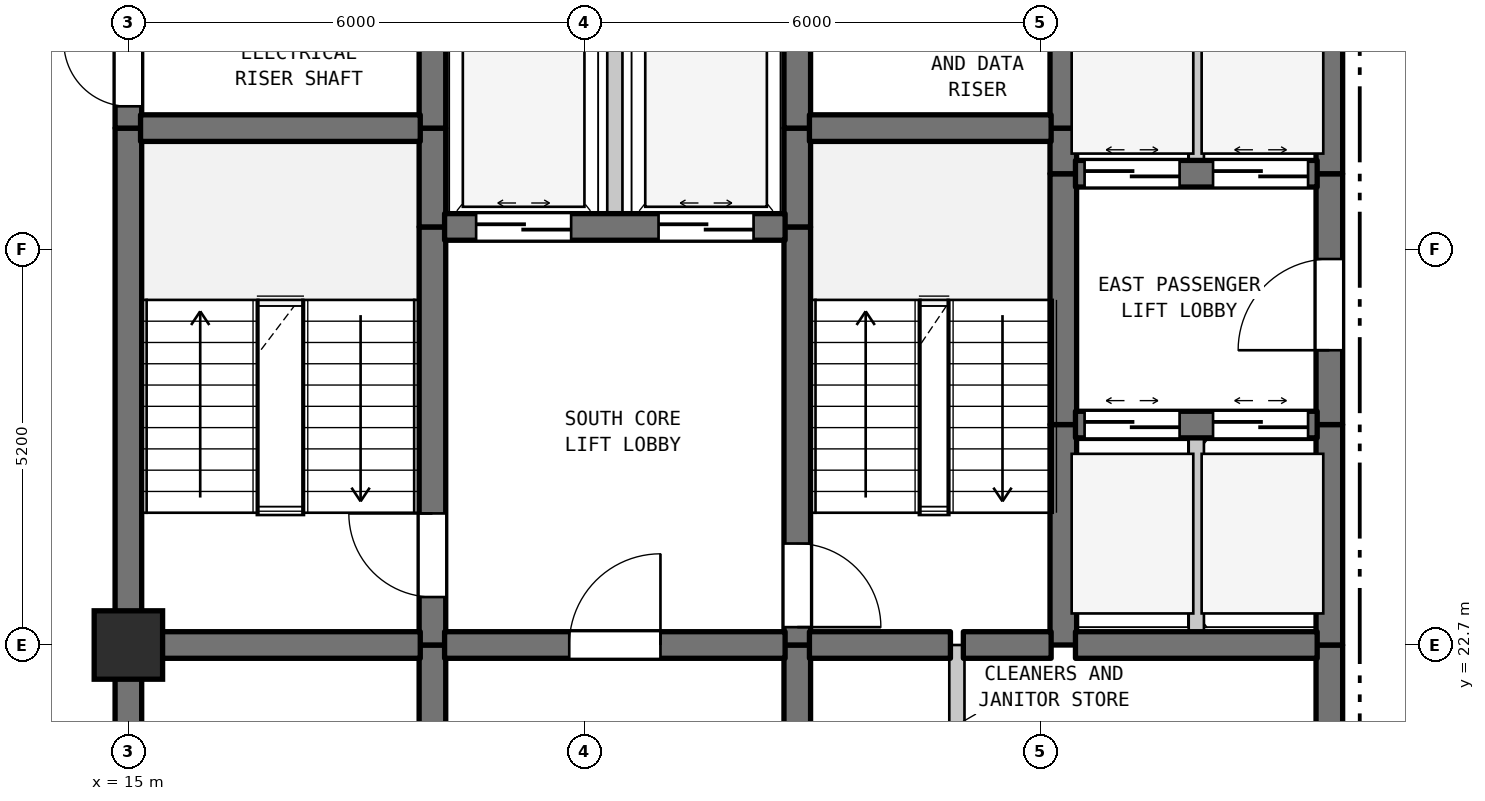
"""IFC4 building model, lengths in metres.
Left out: names, types, materials, properties, quantities, classifications, styles, units other than length and angle.
Written with IfcOpenShell. Run it as: python <this file> out.ifc"""

import sys

from ifc_helpers import new_model, si_unit, direction, frame, frame_2d, origin, origin_2d, place, context, subcontext, project, spatial, rectangle, extrude, element, fill, save


model = new_model("IFC4")
c1 = context("Model", 3, precision=1e-05, world=origin(), true_north=direction((0.0, 1.0)))
c2 = subcontext(c1, "Body", "Model", "MODEL_VIEW")
j1 = project(units=[si_unit("LENGTHUNIT", "METRE"), si_unit("PLANEANGLEUNIT", "RADIAN")], contexts=[c1])
p1 = place(None, origin())
s1 = spatial("IfcSite", under=j1, at=p1, CompositionType="ELEMENT")
p2 = place(p1, origin())
s2 = spatial("IfcBuilding", under=s1, at=p2, CompositionType="ELEMENT")
p3 = place(p2, frame((0.0, 0.0, 129.8)))
s3 = spatial("IfcBuildingStorey", under=s2, at=p3, CompositionType="ELEMENT", Elevation=129.8)
p4 = place(p3, frame((15.0, 22.7, 0.0), z_axis=(0.0, 0.0, 1.0), x_axis=(1.0, 0.0, 0.0)))
e1 = element("IfcColumn", 1, at=p4, inside=s3, PredefinedType="COLUMN", context=c2, shape_type="SweptSolid", body=[
    extrude(rectangle(XDim=0.9, YDim=0.9, at=origin_2d()), origin(), (0.0, 0.0, 1.0), 3.7),
])
p5 = place(p3, frame((15.0, 19.5, 0.0), z_axis=(0.0, 0.0, 1.0), x_axis=(0.0, 1.0, 0.0)))
e2 = element("IfcWall", 2, at=p5, inside=s3, PredefinedType="SHEAR", context=c2, shape_type="SweptSolid", body=[
    extrude(rectangle(XDim=3.2, YDim=0.35, at=frame_2d((1.6, 0.0))), origin(), (0.0, 0.0, 1.0), 3.385),
])
p6 = place(p3, frame((15.0, 22.7, 0.0), z_axis=(0.0, 0.0, 1.0), x_axis=(0.0, 1.0, 0.0)))
e3 = element("IfcWall", 3, at=p6, inside=s3, PredefinedType="SHEAR", context=c2, shape_type="SweptSolid", body=[
    extrude(rectangle(XDim=6.8, YDim=0.35, at=frame_2d((3.4, 0.0))), origin(), (0.0, 0.0, 1.0), 3.385),
])
p7 = place(p3, frame((15.0, 29.5, 0.0), z_axis=(0.0, 0.0, 1.0), x_axis=(0.0, 1.0, 0.0)))
e4 = element("IfcWall", 4, at=p7, inside=s3, PredefinedType="SHEAR", context=c2, shape_type="SweptSolid", body=[
    extrude(rectangle(XDim=1.6, YDim=0.35, at=frame_2d((0.8, 0.0))), origin(), (0.0, 0.0, 1.0), 3.385),
])
p8 = place(p7, frame((0.287, 0.0, 0.0)))
e5 = element("IfcOpeningElement", 5, at=p8, cuts=e4, PredefinedType="OPENING", context=c2, shape_type="SweptSolid", body=[
    extrude(rectangle(XDim=0.85, YDim=2.1, at=frame_2d((0.425, 1.05))), frame((0.0, 0.185, 0.0), z_axis=(0.0, -1.0, 0.0), x_axis=(1.0, 0.0, 0.0)), (0.0, 0.0, 1.0), 0.37),
])
p9 = place(p3, frame((19.0, 19.5, 0.0), z_axis=(0.0, 0.0, 1.0), x_axis=(0.0, 1.0, 0.0)))
e6 = element("IfcWall", 6, at=p9, inside=s3, PredefinedType="SHEAR", context=c2, shape_type="SweptSolid", body=[
    extrude(rectangle(XDim=3.2, YDim=0.35, at=frame_2d((1.6, 0.0))), origin(), (0.0, 0.0, 1.0), 3.385),
])
p10 = place(p3, frame((19.0, 22.7, 0.0), z_axis=(0.0, 0.0, 1.0), x_axis=(0.0, 1.0, 0.0)))
e7 = element("IfcWall", 7, at=p10, inside=s3, PredefinedType="SHEAR", context=c2, shape_type="SweptSolid", body=[
    extrude(rectangle(XDim=5.5, YDim=0.35, at=frame_2d((2.75, 0.0))), origin(), (0.0, 0.0, 1.0), 3.385),
])
p11 = place(p10, frame((0.631, 0.0, 0.0)))
e8 = element("IfcOpeningElement", 8, at=p11, cuts=e7, PredefinedType="OPENING", context=c2, shape_type="SweptSolid", body=[
    extrude(rectangle(XDim=1.1, YDim=2.15, at=frame_2d((0.55, 1.075))), frame((0.0, 0.185, 0.0), z_axis=(0.0, -1.0, 0.0), x_axis=(1.0, 0.0, 0.0)), (0.0, 0.0, 1.0), 0.37),
])
p12 = place(p3, frame((19.0, 28.2, 0.0), z_axis=(0.0, 0.0, 1.0), x_axis=(0.0, 1.0, 0.0)))
e9 = element("IfcWall", 9, at=p12, inside=s3, PredefinedType="SHEAR", context=c2, shape_type="SweptSolid", body=[
    extrude(rectangle(XDim=1.3, YDim=0.35, at=frame_2d((0.65, 0.0))), origin(), (0.0, 0.0, 1.0), 3.385),
])
p13 = place(p3, frame((19.0, 29.5, 0.0), z_axis=(0.0, 0.0, 1.0), x_axis=(0.0, 1.0, 0.0)))
e10 = element("IfcWall", 10, at=p13, inside=s3, PredefinedType="SHEAR", context=c2, shape_type="SweptSolid", body=[
    extrude(rectangle(XDim=5.5, YDim=0.35, at=frame_2d((2.75, 0.0))), origin(), (0.0, 0.0, 1.0), 3.385),
])
p14 = place(p13, frame((2.025, 0.0, 0.0)))
e11 = element("IfcOpeningElement", 11, at=p14, cuts=e10, PredefinedType="OPENING", context=c2, shape_type="SweptSolid", body=[
    extrude(rectangle(XDim=1.1, YDim=2.15, at=frame_2d((0.55, 1.075))), frame((0.0, 0.185, 0.0), z_axis=(0.0, -1.0, 0.0), x_axis=(1.0, 0.0, 0.0)), (0.0, 0.0, 1.0), 0.37),
])
p15 = place(p3, frame((21.4, 28.2, 0.0), z_axis=(0.0, 0.0, 1.0), x_axis=(0.0, 1.0, 0.0)))
e12 = element("IfcWall", 12, at=p15, inside=s3, PredefinedType="STANDARD", context=c2, shape_type="SweptSolid", body=[
    extrude(rectangle(XDim=2.6, YDim=0.2, at=frame_2d((1.3, 0.0))), origin(), (0.0, 0.0, 1.0), 3.385),
])
p16 = place(p3, frame((23.8, 19.5, 0.0), z_axis=(0.0, 0.0, 1.0), x_axis=(0.0, 1.0, 0.0)))
e13 = element("IfcWall", 13, at=p16, inside=s3, PredefinedType="SHEAR", context=c2, shape_type="SweptSolid", body=[
    extrude(rectangle(XDim=3.2, YDim=0.35, at=frame_2d((1.6, 0.0))), origin(), (0.0, 0.0, 1.0), 3.385),
])
p17 = place(p3, frame((23.8, 22.7, 0.0), z_axis=(0.0, 0.0, 1.0), x_axis=(0.0, 1.0, 0.0)))
e14 = element("IfcWall", 14, at=p17, inside=s3, PredefinedType="SHEAR", context=c2, shape_type="SweptSolid", body=[
    extrude(rectangle(XDim=5.5, YDim=0.35, at=frame_2d((2.75, 0.0))), origin(), (0.0, 0.0, 1.0), 3.385),
])
p18 = place(p17, frame((0.235, 0.0, 0.0)))
e15 = element("IfcOpeningElement", 15, at=p18, cuts=e14, PredefinedType="OPENING", context=c2, shape_type="SweptSolid", body=[
    extrude(rectangle(XDim=1.1, YDim=2.15, at=frame_2d((0.55, 1.075))), frame((0.0, 0.185, 0.0), z_axis=(0.0, -1.0, 0.0), x_axis=(1.0, 0.0, 0.0)), (0.0, 0.0, 1.0), 0.37),
])
for number, where, z_axis, x_axis in (
    (16, (23.8, 28.2, 0.0), (0.0, 0.0, 1.0), (0.0, 1.0, 0.0)),
    (17, (23.8, 29.5, 0.0), (0.0, 0.0, 1.0), (0.0, 1.0, 0.0)),
):
    element("IfcWall", number, at=place(p3, frame(where, z_axis=z_axis, x_axis=x_axis)), inside=s3, PredefinedType="SHEAR", context=c2, shape_type="SweptSolid", body=[
        extrude(rectangle(XDim=1.3, YDim=0.35, at=frame_2d((0.65, 0.0))), origin(), (0.0, 0.0, 1.0), 3.385),
    ])
p19 = place(p3, frame((25.9, 19.5, 0.0), z_axis=(0.0, 0.0, 1.0), x_axis=(0.0, 1.0, 0.0)))
e18 = element("IfcWall", 18, at=p19, inside=s3, PredefinedType="STANDARD", context=c2, shape_type="SweptSolid", body=[
    extrude(rectangle(XDim=3.2, YDim=0.2, at=frame_2d((1.6, 0.0))), origin(), (0.0, 0.0, 1.0), 3.385),
])
p20 = place(p3, frame((27.3, 22.7, 0.0), z_axis=(0.0, 0.0, 1.0), x_axis=(0.0, 1.0, 0.0)))
e19 = element("IfcWall", 19, at=p20, inside=s3, PredefinedType="SHEAR", context=c2, shape_type="SweptSolid", body=[
    extrude(rectangle(XDim=2.9, YDim=0.35, at=frame_2d((1.45, 0.0))), origin(), (0.0, 0.0, 1.0), 3.385),
])
p21 = place(p3, frame((27.3, 25.6, 0.0), z_axis=(0.0, 0.0, 1.0), x_axis=(0.0, 1.0, 0.0)))
e20 = element("IfcWall", 20, at=p21, inside=s3, PredefinedType="SHEAR", context=c2, shape_type="SweptSolid", body=[
    extrude(rectangle(XDim=3.3, YDim=0.35, at=frame_2d((1.65, 0.0))), origin(), (0.0, 0.0, 1.0), 3.385),
])
p22 = place(p3, frame((27.3, 28.9, 0.0), z_axis=(0.0, 0.0, 1.0), x_axis=(0.0, 1.0, 0.0)))
e21 = element("IfcWall", 21, at=p22, inside=s3, PredefinedType="SHEAR", context=c2, shape_type="SweptSolid", body=[
    extrude(rectangle(XDim=0.6, YDim=0.35, at=frame_2d((0.3, 0.0))), origin(), (0.0, 0.0, 1.0), 3.385),
])
p23 = place(p3, frame((27.3, 29.5, 0.0), z_axis=(0.0, 0.0, 1.0), x_axis=(0.0, 1.0, 0.0)))
e22 = element("IfcWall", 22, at=p23, inside=s3, PredefinedType="SHEAR", context=c2, shape_type="SweptSolid", body=[
    extrude(rectangle(XDim=2.0, YDim=0.35, at=frame_2d((1.0, 0.0))), origin(), (0.0, 0.0, 1.0), 3.385),
])
p24 = place(p3, frame((29.05, 22.7, 0.0), z_axis=(0.0, 0.0, 1.0), x_axis=(0.0, 1.0, 0.0)))
e23 = element("IfcWall", 23, at=p24, inside=s3, PredefinedType="STANDARD", context=c2, shape_type="SweptSolid", body=[
    extrude(rectangle(XDim=2.9, YDim=0.2, at=frame_2d((1.45, 0.0))), origin(), (0.0, 0.0, 1.0), 3.385),
])
p25 = place(p3, frame((29.05, 28.9, 0.0), z_axis=(0.0, 0.0, 1.0), x_axis=(0.0, 1.0, 0.0)))
e24 = element("IfcWall", 24, at=p25, inside=s3, PredefinedType="STANDARD", context=c2, shape_type="SweptSolid", body=[
    extrude(rectangle(XDim=2.6, YDim=0.2, at=frame_2d((1.3, 0.0))), origin(), (0.0, 0.0, 1.0), 3.385),
])
p26 = place(p3, frame((30.8, 19.5, 0.0), z_axis=(0.0, 0.0, 1.0), x_axis=(0.0, 1.0, 0.0)))
e25 = element("IfcWall", 25, at=p26, inside=s3, PredefinedType="SHEAR", context=c2, shape_type="SweptSolid", body=[
    extrude(rectangle(XDim=3.2, YDim=0.35, at=frame_2d((1.6, 0.0))), origin(), (0.0, 0.0, 1.0), 3.385),
])
p27 = place(p3, frame((30.8, 22.7, 0.0), z_axis=(0.0, 0.0, 1.0), x_axis=(0.0, 1.0, 0.0)))
e26 = element("IfcWall", 26, at=p27, inside=s3, PredefinedType="SHEAR", context=c2, shape_type="SweptSolid", body=[
    extrude(rectangle(XDim=2.9, YDim=0.35, at=frame_2d((1.45, 0.0))), origin(), (0.0, 0.0, 1.0), 3.385),
])
p28 = place(p3, frame((30.8, 25.6, 0.0), z_axis=(0.0, 0.0, 1.0), x_axis=(0.0, 1.0, 0.0)))
e27 = element("IfcWall", 27, at=p28, inside=s3, PredefinedType="SHEAR", context=c2, shape_type="SweptSolid", body=[
    extrude(rectangle(XDim=3.3, YDim=0.35, at=frame_2d((1.65, 0.0))), origin(), (0.0, 0.0, 1.0), 3.385),
])
p29 = place(p28, frame((0.978, 0.0, 0.0)))
e28 = element("IfcOpeningElement", 28, at=p29, cuts=e27, PredefinedType="OPENING", context=c2, shape_type="SweptSolid", body=[
    extrude(rectangle(XDim=1.2, YDim=2.2, at=frame_2d((0.6, 1.1))), frame((0.0, 0.185, 0.0), z_axis=(0.0, -1.0, 0.0), x_axis=(1.0, 0.0, 0.0)), (0.0, 0.0, 1.0), 0.37),
])
p30 = place(p3, frame((30.8, 28.9, 0.0), z_axis=(0.0, 0.0, 1.0), x_axis=(0.0, 1.0, 0.0)))
e29 = element("IfcWall", 29, at=p30, inside=s3, PredefinedType="SHEAR", context=c2, shape_type="SweptSolid", body=[
    extrude(rectangle(XDim=2.6, YDim=0.35, at=frame_2d((1.3, 0.0))), origin(), (0.0, 0.0, 1.0), 3.385),
])
p31 = place(p3, frame((15.16, 22.7, 0.0), z_axis=(0.0, 0.0, 1.0), x_axis=(1.0, 0.0, 0.0)))
e30 = element("IfcWall", 30, at=p31, inside=s3, PredefinedType="SHEAR", context=c2, shape_type="SweptSolid", body=[
    extrude(rectangle(XDim=3.68, YDim=0.35, at=frame_2d((1.84, 0.0))), origin(), (0.0, 0.0, 1.0), 3.385),
])
p32 = place(p3, frame((19.16, 22.7, 0.0), z_axis=(0.0, 0.0, 1.0), x_axis=(1.0, 0.0, 0.0)))
e31 = element("IfcWall", 31, at=p32, inside=s3, PredefinedType="SHEAR", context=c2, shape_type="SweptSolid", body=[
    extrude(rectangle(XDim=4.48, YDim=0.35, at=frame_2d((2.24, 0.0))), origin(), (0.0, 0.0, 1.0), 3.385),
])
p33 = place(p32, frame((1.64, 0.0, 0.0)))
e32 = element("IfcOpeningElement", 32, at=p33, cuts=e31, PredefinedType="OPENING", context=c2, shape_type="SweptSolid", body=[
    extrude(rectangle(XDim=1.2, YDim=2.2, at=frame_2d((0.6, 1.1))), frame((0.0, 0.185, 0.0), z_axis=(0.0, -1.0, 0.0), x_axis=(1.0, 0.0, 0.0)), (0.0, 0.0, 1.0), 0.37),
])
p34 = place(p3, frame((23.96, 22.7, 0.0), z_axis=(0.0, 0.0, 1.0), x_axis=(1.0, 0.0, 0.0)))
e33 = element("IfcWall", 33, at=p34, inside=s3, PredefinedType="SHEAR", context=c2, shape_type="SweptSolid", body=[
    extrude(rectangle(XDim=1.855, YDim=0.35, at=frame_2d((0.927, 0.0))), origin(), (0.0, 0.0, 1.0), 3.385),
])
p35 = place(p3, frame((25.985, 22.7, 0.0), z_axis=(0.0, 0.0, 1.0), x_axis=(1.0, 0.0, 0.0)))
e34 = element("IfcWall", 34, at=p35, inside=s3, PredefinedType="SHEAR", context=c2, shape_type="SweptSolid", body=[
    extrude(rectangle(XDim=1.155, YDim=0.35, at=frame_2d((0.577, 0.0))), origin(), (0.0, 0.0, 1.0), 3.385),
])
p36 = place(p3, frame((27.46, 22.7, 0.0), z_axis=(0.0, 0.0, 1.0), x_axis=(1.0, 0.0, 0.0)))
e35 = element("IfcWall", 35, at=p36, inside=s3, PredefinedType="SHEAR", context=c2, shape_type="SweptSolid", body=[
    extrude(rectangle(XDim=3.18, YDim=0.35, at=frame_2d((1.59, 0.0))), origin(), (0.0, 0.0, 1.0), 3.385),
])
p37 = place(p3, frame((27.46, 25.6, 0.0), z_axis=(0.0, 0.0, 1.0), x_axis=(1.0, 0.0, 0.0)))
e36 = element("IfcWall", 36, at=p37, inside=s3, PredefinedType="SHEAR", context=c2, shape_type="SweptSolid", body=[
    extrude(rectangle(XDim=3.18, YDim=0.35, at=frame_2d((1.59, 0.0))), origin(), (0.0, 0.0, 1.0), 3.385),
])
p38 = place(p37, frame((0.12, 0.0, 0.0)))
e37 = element("IfcOpeningElement", 37, at=p38, cuts=e36, PredefinedType="OPENING", context=c2, shape_type="SweptSolid", body=[
    extrude(rectangle(XDim=1.25, YDim=2.2, at=frame_2d((0.625, 1.1))), frame((0.0, 0.185, 0.0), z_axis=(0.0, -1.0, 0.0), x_axis=(1.0, 0.0, 0.0)), (0.0, 0.0, 1.0), 0.37),
])
p39 = place(p37, frame((1.81, 0.0, 0.0)))
e38 = element("IfcOpeningElement", 38, at=p39, cuts=e36, PredefinedType="OPENING", context=c2, shape_type="SweptSolid", body=[
    extrude(rectangle(XDim=1.25, YDim=2.2, at=frame_2d((0.625, 1.1))), frame((0.0, 0.185, 0.0), z_axis=(0.0, -1.0, 0.0), x_axis=(1.0, 0.0, 0.0)), (0.0, 0.0, 1.0), 0.37),
])
p40 = place(p3, frame((19.16, 28.2, 0.0), z_axis=(0.0, 0.0, 1.0), x_axis=(1.0, 0.0, 0.0)))
e39 = element("IfcWall", 39, at=p40, inside=s3, PredefinedType="SHEAR", context=c2, shape_type="SweptSolid", body=[
    extrude(rectangle(XDim=4.48, YDim=0.35, at=frame_2d((2.24, 0.0))), origin(), (0.0, 0.0, 1.0), 3.385),
])
p41 = place(p40, frame((0.415, 0.0, 0.0)))
e40 = element("IfcOpeningElement", 40, at=p41, cuts=e39, PredefinedType="OPENING", context=c2, shape_type="SweptSolid", body=[
    extrude(rectangle(XDim=1.25, YDim=2.2, at=frame_2d((0.625, 1.1))), frame((0.0, 0.185, 0.0), z_axis=(0.0, -1.0, 0.0), x_axis=(1.0, 0.0, 0.0)), (0.0, 0.0, 1.0), 0.37),
])
p42 = place(p40, frame((2.815, 0.0, 0.0)))
e41 = element("IfcOpeningElement", 41, at=p42, cuts=e39, PredefinedType="OPENING", context=c2, shape_type="SweptSolid", body=[
    extrude(rectangle(XDim=1.25, YDim=2.2, at=frame_2d((0.625, 1.1))), frame((0.0, 0.185, 0.0), z_axis=(0.0, -1.0, 0.0), x_axis=(1.0, 0.0, 0.0)), (0.0, 0.0, 1.0), 0.37),
])
p43 = place(p3, frame((27.46, 28.9, 0.0), z_axis=(0.0, 0.0, 1.0), x_axis=(1.0, 0.0, 0.0)))
e42 = element("IfcWall", 42, at=p43, inside=s3, PredefinedType="SHEAR", context=c2, shape_type="SweptSolid", body=[
    extrude(rectangle(XDim=3.18, YDim=0.35, at=frame_2d((1.59, 0.0))), origin(), (0.0, 0.0, 1.0), 3.385),
])
p44 = place(p43, frame((0.12, 0.0, 0.0)))
e43 = element("IfcOpeningElement", 43, at=p44, cuts=e42, PredefinedType="OPENING", context=c2, shape_type="SweptSolid", body=[
    extrude(rectangle(XDim=1.25, YDim=2.2, at=frame_2d((0.625, 1.1))), frame((0.0, 0.185, 0.0), z_axis=(0.0, -1.0, 0.0), x_axis=(1.0, 0.0, 0.0)), (0.0, 0.0, 1.0), 0.37),
])
p45 = place(p43, frame((1.81, 0.0, 0.0)))
e44 = element("IfcOpeningElement", 44, at=p45, cuts=e42, PredefinedType="OPENING", context=c2, shape_type="SweptSolid", body=[
    extrude(rectangle(XDim=1.25, YDim=2.2, at=frame_2d((0.625, 1.1))), frame((0.0, 0.185, 0.0), z_axis=(0.0, -1.0, 0.0), x_axis=(1.0, 0.0, 0.0)), (0.0, 0.0, 1.0), 0.37),
])
p46 = place(p3, frame((15.16, 29.5, 0.0), z_axis=(0.0, 0.0, 1.0), x_axis=(1.0, 0.0, 0.0)))
e45 = element("IfcWall", 45, at=p46, inside=s3, PredefinedType="SHEAR", context=c2, shape_type="SweptSolid", body=[
    extrude(rectangle(XDim=3.68, YDim=0.35, at=frame_2d((1.84, 0.0))), origin(), (0.0, 0.0, 1.0), 3.385),
])
p47 = place(p3, frame((23.96, 29.5, 0.0), z_axis=(0.0, 0.0, 1.0), x_axis=(1.0, 0.0, 0.0)))
e46 = element("IfcWall", 46, at=p47, inside=s3, PredefinedType="SHEAR", context=c2, shape_type="SweptSolid", body=[
    extrude(rectangle(XDim=3.18, YDim=0.35, at=frame_2d((1.59, 0.0))), origin(), (0.0, 0.0, 1.0), 3.385),
])
p48 = place(p8, origin())
e47 = element("IfcDoor", 47, at=p48, inside=s3, OperationType="SINGLE_SWING_RIGHT", PredefinedType="DOOR", context=c2, shape_type="SweptSolid", body=[
    extrude(rectangle(XDim=0.85, YDim=2.1, at=frame_2d((0.425, 1.05))), frame((0.0, 0.025, 0.0), z_axis=(0.0, -1.0, 0.0), x_axis=(1.0, 0.0, 0.0)), (0.0, 0.0, 1.0), 0.05),
])
fill(e5, e47)
p49 = place(p11, origin())
e48 = element("IfcDoor", 48, at=p49, inside=s3, OperationType="SINGLE_SWING_RIGHT", PredefinedType="DOOR", context=c2, shape_type="SweptSolid", body=[
    extrude(rectangle(XDim=1.1, YDim=2.15, at=frame_2d((0.55, 1.075))), frame((0.0, 0.025, 0.0), z_axis=(0.0, -1.0, 0.0), x_axis=(1.0, 0.0, 0.0)), (0.0, 0.0, 1.0), 0.05),
])
fill(e8, e48)
p50 = place(p18, frame((1.1, 0.0, 0.0), z_axis=(0.0, 0.0, 1.0), x_axis=(-1.0, 0.0, 0.0)))
e49 = element("IfcDoor", 49, at=p50, inside=s3, OperationType="SINGLE_SWING_LEFT", PredefinedType="DOOR", context=c2, shape_type="SweptSolid", body=[
    extrude(rectangle(XDim=1.1, YDim=2.15, at=frame_2d((0.55, 1.075))), frame((0.0, 0.025, 0.0), z_axis=(0.0, -1.0, 0.0), x_axis=(1.0, 0.0, 0.0)), (0.0, 0.0, 1.0), 0.05),
])
fill(e15, e49)
p51 = place(p29, origin())
e50 = element("IfcDoor", 50, at=p51, inside=s3, OperationType="SINGLE_SWING_LEFT", PredefinedType="DOOR", context=c2, shape_type="SweptSolid", body=[
    extrude(rectangle(XDim=1.2, YDim=2.2, at=frame_2d((0.6, 1.1))), frame((0.0, 0.025, 0.0), z_axis=(0.0, -1.0, 0.0), x_axis=(1.0, 0.0, 0.0)), (0.0, 0.0, 1.0), 0.05),
])
fill(e28, e50)
p52 = place(p33, origin())
e51 = element("IfcDoor", 51, at=p52, inside=s3, OperationType="SINGLE_SWING_RIGHT", PredefinedType="DOOR", context=c2, shape_type="SweptSolid", body=[
    extrude(rectangle(XDim=1.2, YDim=2.2, at=frame_2d((0.6, 1.1))), frame((0.0, 0.025, 0.0), z_axis=(0.0, -1.0, 0.0), x_axis=(1.0, 0.0, 0.0)), (0.0, 0.0, 1.0), 0.05),
])
fill(e32, e51)
p53 = place(p38, origin())
e52 = element("IfcDoor", 52, at=p53, inside=s3, OperationType="DOUBLE_DOOR_SLIDING", PredefinedType="DOOR", context=c2, shape_type="SweptSolid", body=[
    extrude(rectangle(XDim=1.25, YDim=2.2, at=frame_2d((0.625, 1.1))), frame((0.0, 0.025, 0.0), z_axis=(0.0, -1.0, 0.0), x_axis=(1.0, 0.0, 0.0)), (0.0, 0.0, 1.0), 0.05),
])
fill(e37, e52)
p54 = place(p39, origin())
e53 = element("IfcDoor", 53, at=p54, inside=s3, OperationType="DOUBLE_DOOR_SLIDING", PredefinedType="DOOR", context=c2, shape_type="SweptSolid", body=[
    extrude(rectangle(XDim=1.25, YDim=2.2, at=frame_2d((0.625, 1.1))), frame((0.0, 0.025, 0.0), z_axis=(0.0, -1.0, 0.0), x_axis=(1.0, 0.0, 0.0)), (0.0, 0.0, 1.0), 0.05),
])
fill(e38, e53)
p55 = place(p41, origin())
e54 = element("IfcDoor", 54, at=p55, inside=s3, OperationType="DOUBLE_DOOR_SLIDING", PredefinedType="DOOR", context=c2, shape_type="SweptSolid", body=[
    extrude(rectangle(XDim=1.25, YDim=2.2, at=frame_2d((0.625, 1.1))), frame((0.0, 0.025, 0.0), z_axis=(0.0, -1.0, 0.0), x_axis=(1.0, 0.0, 0.0)), (0.0, 0.0, 1.0), 0.05),
])
fill(e40, e54)
p56 = place(p42, origin())
e55 = element("IfcDoor", 55, at=p56, inside=s3, OperationType="DOUBLE_DOOR_SLIDING", PredefinedType="DOOR", context=c2, shape_type="SweptSolid", body=[
    extrude(rectangle(XDim=1.25, YDim=2.2, at=frame_2d((0.625, 1.1))), frame((0.0, 0.025, 0.0), z_axis=(0.0, -1.0, 0.0), x_axis=(1.0, 0.0, 0.0)), (0.0, 0.0, 1.0), 0.05),
])
fill(e41, e55)
p57 = place(p44, origin())
e56 = element("IfcDoor", 56, at=p57, inside=s3, OperationType="DOUBLE_DOOR_SLIDING", PredefinedType="DOOR", context=c2, shape_type="SweptSolid", body=[
    extrude(rectangle(XDim=1.25, YDim=2.2, at=frame_2d((0.625, 1.1))), frame((0.0, 0.025, 0.0), z_axis=(0.0, -1.0, 0.0), x_axis=(1.0, 0.0, 0.0)), (0.0, 0.0, 1.0), 0.05),
])
fill(e43, e56)
p58 = place(p45, origin())
e57 = element("IfcDoor", 57, at=p58, inside=s3, OperationType="DOUBLE_DOOR_SLIDING", PredefinedType="DOOR", context=c2, shape_type="SweptSolid", body=[
    extrude(rectangle(XDim=1.25, YDim=2.2, at=frame_2d((0.625, 1.1))), frame((0.0, 0.025, 0.0), z_axis=(0.0, -1.0, 0.0), x_axis=(1.0, 0.0, 0.0)), (0.0, 0.0, 1.0), 0.05),
])
fill(e44, e57)
save(model, sys.argv[1])
